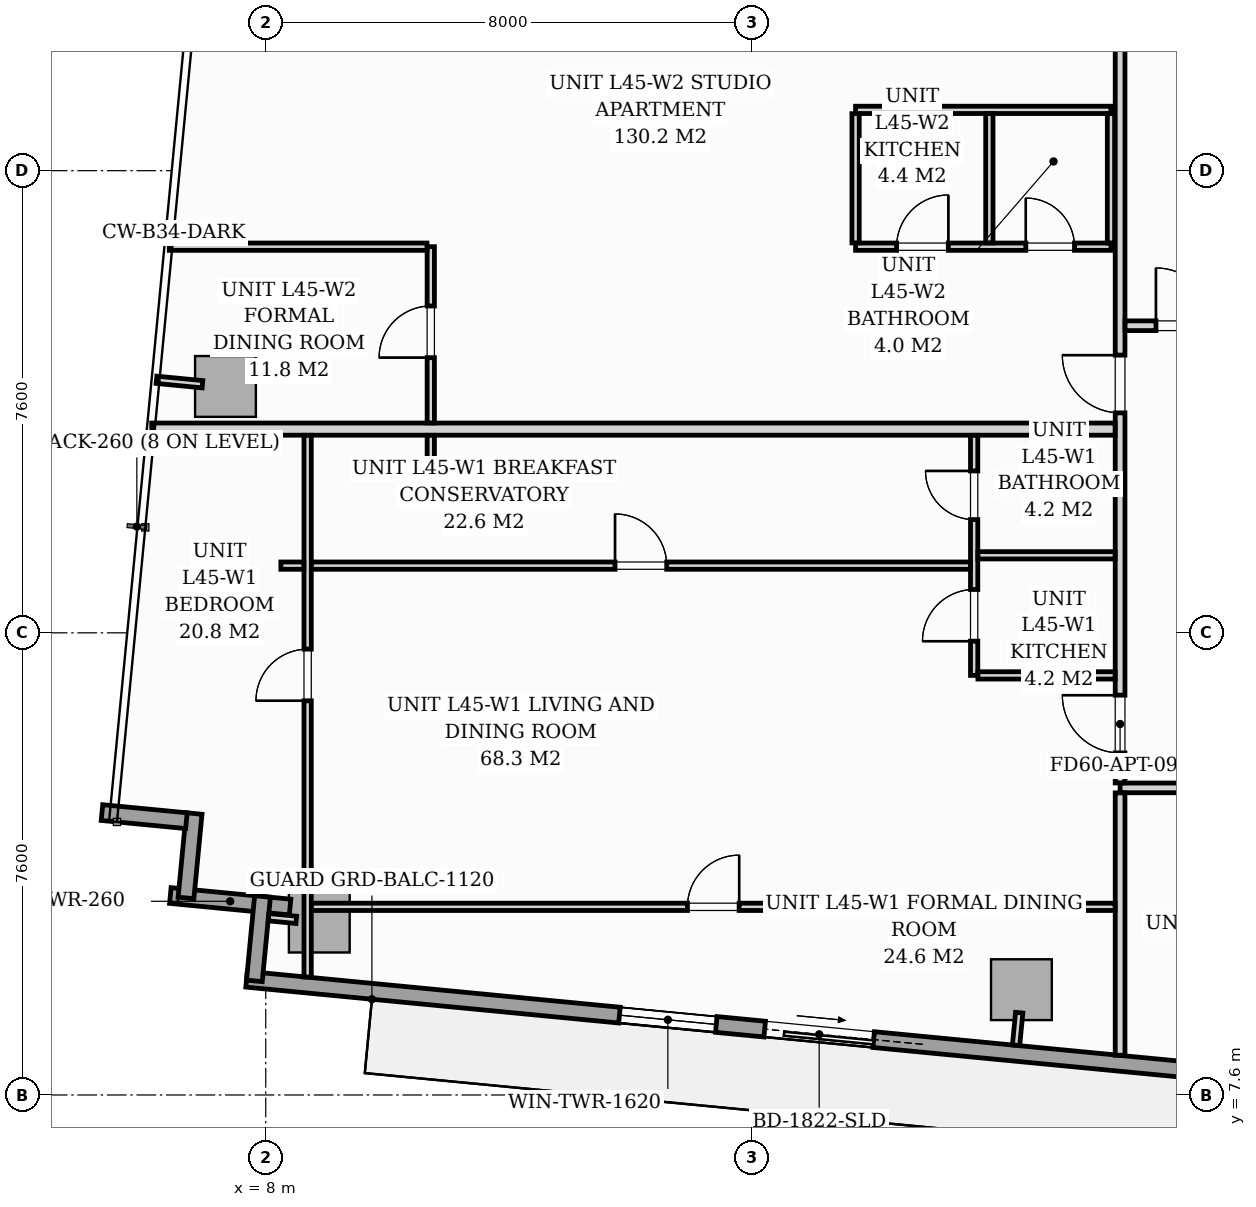
"""IFC4 building model, lengths in metres.
Left out: names, types, materials, properties, quantities, classifications, styles, units other than length and angle.
Written with IfcOpenShell. Run it as: python <this file> out.ifc"""

import sys

from ifc_helpers import new_model, si_unit, direction, frame, frame_2d, origin, origin_2d, place, context, subcontext, project, spatial, rectangle, extrude, source, transform, mapped, element, fill, save


model = new_model("IFC4")
c1 = context("Model", 3, precision=1e-05, world=origin(), true_north=direction((0.0, 1.0)))
c2 = subcontext(c1, "Body", "Model", "MODEL_VIEW")
j1 = project(units=[si_unit("LENGTHUNIT", "METRE"), si_unit("PLANEANGLEUNIT", "RADIAN")], contexts=[c1])
p1 = place(None, origin())
s1 = spatial("IfcSite", under=j1, at=p1, CompositionType="ELEMENT")
p2 = place(p1, origin())
s2 = spatial("IfcBuilding", under=s1, at=p2, CompositionType="ELEMENT")
p3 = place(p2, frame((0.0, 0.0, 156.6)))
s3 = spatial("IfcBuildingStorey", under=s2, at=p3, CompositionType="ELEMENT", Elevation=156.6)
m1 = source(origin(), c2, "Body", "SweptSolid", [
    extrude(rectangle(XDim=1.0, YDim=1.0, at=origin_2d()), origin(), (0.0, 0.0, 1.0), 3.196),
])
for number, where, z_axis, x_axis in (
    (1, (8.881, 10.443, 0.002), (0.0, 0.0, 1.0), (0.995, -0.096, 0.0)),
    (2, (20.427, 9.332, 0.002), (0.0, 0.0, 1.0), (0.995, -0.096, 0.0)),
    (3, (7.338, 19.252, 0.002), (0.0, 0.0, 1.0), (0.995, -0.096, 0.0)),
):
    element("IfcColumn", number, at=place(p3, frame(where, z_axis=z_axis, x_axis=x_axis)), inside=s3, PredefinedType="COLUMN", context=c2, shape_type="MappedRepresentation", body=[
        mapped(m1, transform((0.0, 0.0, 0.0), scale=1.0)),
    ])
p4 = place(p3, frame((8.4, 10.69, 0.0), z_axis=(0.0, 0.0, 1.0), x_axis=(-0.995391147587, 0.095898192396, 0.0)))
e4 = element("IfcWall", 4, at=p4, inside=s3, PredefinedType="STANDARD", context=c2, shape_type="SweptSolid", body=[
    extrude(rectangle(XDim=1.978, YDim=0.26, at=frame_2d((0.989, 0.0))), origin(), (0.0, 0.0, 1.0), 2.94),
])
p5 = place(p3, frame((6.688, 10.84, 0.0), z_axis=(0.0, 0.0, 1.0), x_axis=(0.09589913835, 0.995391056452, 0.0)))
e5 = element("IfcWall", 5, at=p5, inside=s3, PredefinedType="STANDARD", context=c2, shape_type="SweptSolid", body=[
    extrude(rectangle(XDim=1.395, YDim=0.26, at=frame_2d((0.698, 0.0))), origin(), (0.0, 0.0, 1.0), 2.94),
])
p6 = place(p3, frame((6.695, 12.111, 0.0), z_axis=(0.0, 0.0, 1.0), x_axis=(-0.99540614245, 0.095742423056, 0.0)))
e6 = element("IfcWall", 6, at=p6, inside=s3, PredefinedType="STANDARD", context=c2, shape_type="SweptSolid", body=[
    extrude(rectangle(XDim=1.395, YDim=0.26, at=frame_2d((0.697, 0.0))), origin(), (0.0, 0.0, 1.0), 2.94),
])
p7 = place(p3, frame((24.617, 7.873, 0.0), z_axis=(0.0, 0.0, 1.0), x_axis=(-0.995395976631, 0.095848055311, 0.0)))
e7 = element("IfcWall", 7, at=p7, inside=s3, PredefinedType="STANDARD", context=c2, shape_type="SweptSolid", body=[
    extrude(rectangle(XDim=17.01, YDim=0.26, at=frame_2d((8.505, 0.0))), origin(), (0.0, 0.0, 1.0), 2.94),
])
p8 = place(p7, frame((6.65, 0.0, 0.0)))
e8 = element("IfcOpeningElement", 8, at=p8, cuts=e7, PredefinedType="OPENING", context=c2, shape_type="SweptSolid", body=[
    extrude(rectangle(XDim=1.8, YDim=2.06, at=frame_2d((0.9, 1.03))), frame((0.0, 0.14, 0.0), z_axis=(0.0, -1.0, 0.0), x_axis=(1.0, 0.0, 0.0)), (0.0, 0.0, 1.0), 0.28),
])
p9 = place(p7, frame((9.25, 0.0, 0.65)))
e9 = element("IfcOpeningElement", 9, at=p9, cuts=e7, PredefinedType="OPENING", context=c2, shape_type="SweptSolid", body=[
    extrude(rectangle(XDim=1.6, YDim=1.5, at=frame_2d((0.8, 0.75))), frame((0.0, 0.14, 0.0), z_axis=(0.0, -1.0, 0.0), x_axis=(1.0, 0.0, 0.0)), (0.0, 0.0, 1.0), 0.28),
])
p10 = place(p3, frame((7.813, 9.476, 0.0), z_axis=(0.0, 0.0, 1.0), x_axis=(0.095915846097, 0.995389446633, 0.0)))
e10 = element("IfcWall", 10, at=p10, inside=s3, PredefinedType="STANDARD", context=c2, shape_type="SweptSolid", body=[
    extrude(rectangle(XDim=1.395, YDim=0.26, at=frame_2d((0.697, 0.0))), origin(), (0.0, 0.0, 1.0), 2.94),
])
p11 = place(p3, frame((22.05, 12.65, 0.0), z_axis=(0.0, 0.0, 1.0), x_axis=(1.0, 0.0, 0.0)))
e11 = element("IfcWall", 11, at=p11, inside=s3, PredefinedType="PARTITIONING", context=c2, shape_type="SweptSolid", body=[
    extrude(rectangle(XDim=25.65, YDim=0.16, at=frame_2d((12.825, 0.0))), origin(), (0.0, 0.0, 1.0), 2.94),
])
p12 = place(p11, frame((1.736, 0.0, 0.0)))
e12 = element("IfcOpeningElement", 12, at=p12, cuts=e11, PredefinedType="OPENING", context=c2, shape_type="SweptSolid", body=[
    extrude(rectangle(XDim=0.95, YDim=2.06, at=frame_2d((0.475, 1.03))), frame((0.0, 0.09, 0.0), z_axis=(0.0, -1.0, 0.0), x_axis=(1.0, 0.0, 0.0)), (0.0, 0.0, 1.0), 0.18),
])
p13 = place(p11, frame((10.3, 0.0, 0.0)))
e13 = element("IfcOpeningElement", 13, at=p13, cuts=e11, PredefinedType="OPENING", context=c2, shape_type="SweptSolid", body=[
    extrude(rectangle(XDim=0.95, YDim=2.06, at=frame_2d((0.475, 1.03))), frame((0.0, 0.09, 0.0), z_axis=(0.0, -1.0, 0.0), x_axis=(1.0, 0.0, 0.0)), (0.0, 0.0, 1.0), 0.18),
])
p14 = place(p11, frame((22.965, 0.0, 0.0)))
e14 = element("IfcOpeningElement", 14, at=p14, cuts=e11, PredefinedType="OPENING", context=c2, shape_type="SweptSolid", body=[
    extrude(rectangle(XDim=0.95, YDim=2.06, at=frame_2d((0.475, 1.03))), frame((0.0, 0.09, 0.0), z_axis=(0.0, -1.0, 0.0), x_axis=(1.0, 0.0, 0.0)), (0.0, 0.0, 1.0), 0.18),
])
p15 = place(p3, frame((22.05, 8.253, 0.0), z_axis=(0.0, 0.0, 1.0), x_axis=(0.0, 1.0, 0.0)))
e15 = element("IfcWall", 15, at=p15, inside=s3, PredefinedType="PARTITIONING", context=c2, shape_type="SweptSolid", body=[
    extrude(rectangle(XDim=4.315, YDim=0.16, at=frame_2d((2.157, 0.0))), origin(), (0.0, 0.0, 1.0), 2.94),
])
p16 = place(p3, frame((22.05, 12.732, 0.0), z_axis=(0.0, 0.0, 1.0), x_axis=(0.0, 1.0, 0.0)))
e16 = element("IfcWall", 16, at=p16, inside=s3, PredefinedType="PARTITIONING", context=c2, shape_type="SweptSolid", body=[
    extrude(rectangle(XDim=14.685, YDim=0.16, at=frame_2d((7.343, 0.0))), origin(), (0.0, 0.0, 1.0), 2.94),
])
p17 = place(p16, frame((0.493, 0.0, 0.0)))
e17 = element("IfcOpeningElement", 17, at=p17, cuts=e16, PredefinedType="OPENING", context=c2, shape_type="SweptSolid", body=[
    extrude(rectangle(XDim=0.95, YDim=2.06, at=frame_2d((0.475, 1.03))), frame((0.0, 0.09, 0.0), z_axis=(0.0, -1.0, 0.0), x_axis=(1.0, 0.0, 0.0)), (0.0, 0.0, 1.0), 0.18),
])
p18 = place(p16, frame((6.085, 0.0, 0.0)))
e18 = element("IfcOpeningElement", 18, at=p18, cuts=e16, PredefinedType="OPENING", context=c2, shape_type="SweptSolid", body=[
    extrude(rectangle(XDim=0.95, YDim=2.06, at=frame_2d((0.475, 1.03))), frame((0.0, 0.09, 0.0), z_axis=(0.0, -1.0, 0.0), x_axis=(1.0, 0.0, 0.0)), (0.0, 0.0, 1.0), 0.18),
])
p19 = place(p3, frame((6.125, 18.55, 0.0), z_axis=(0.0, 0.0, 1.0), x_axis=(1.0, 0.0, 0.0)))
e19 = element("IfcWall", 19, at=p19, inside=s3, PredefinedType="PARTITIONING", context=c2, shape_type="SweptSolid", body=[
    extrude(rectangle(XDim=15.843, YDim=0.2, at=frame_2d((7.921, 0.0))), origin(), (0.0, 0.0, 1.0), 2.063),
])
p20 = place(p3, frame((19.65, 14.5, 0.0), z_axis=(0.0, 0.0, 1.0), x_axis=(0.0, 1.0, 0.0)))
e20 = element("IfcWall", 20, at=p20, inside=s3, PredefinedType="PARTITIONING", context=c2, shape_type="SweptSolid", body=[
    extrude(rectangle(XDim=3.948, YDim=0.12, at=frame_2d((1.974, 0.0))), origin(), (0.0, 0.0, 1.0), 2.94),
])
p21 = place(p20, frame((0.563, 0.0, 0.0)))
e21 = element("IfcOpeningElement", 21, at=p21, cuts=e20, PredefinedType="OPENING", context=c2, shape_type="SweptSolid", body=[
    extrude(rectangle(XDim=0.85, YDim=2.05, at=frame_2d((0.425, 1.025))), frame((0.0, 0.07, 0.0), z_axis=(0.0, -1.0, 0.0), x_axis=(1.0, 0.0, 0.0)), (0.0, 0.0, 1.0), 0.14),
])
p22 = place(p20, frame((2.562, 0.0, 0.0)))
e22 = element("IfcOpeningElement", 22, at=p22, cuts=e20, PredefinedType="OPENING", context=c2, shape_type="SweptSolid", body=[
    extrude(rectangle(XDim=0.8, YDim=2.02, at=frame_2d((0.4, 1.01))), frame((0.0, 0.07, 0.0), z_axis=(0.0, -1.0, 0.0), x_axis=(1.0, 0.0, 0.0)), (0.0, 0.0, 1.0), 0.14),
])
for number, where, z_axis, x_axis in (
    (23, (19.712, 16.475, 0.0), (0.0, 0.0, 1.0), (1.0, 0.0, 0.0)),
    (24, (19.712, 14.5, 0.0), (0.0, 0.0, 1.0), (1.0, 0.0, 0.0)),
):
    element("IfcWall", number, at=place(p3, frame(where, z_axis=z_axis, x_axis=x_axis)), inside=s3, PredefinedType="PARTITIONING", context=c2, shape_type="SweptSolid", body=[
        extrude(rectangle(XDim=2.256, YDim=0.12, at=frame_2d((1.128, 0.0))), origin(), (0.0, 0.0, 1.0), 2.94),
    ])
p23 = place(p3, frame((8.689, 9.54, 0.0), z_axis=(0.0, 0.0, 1.0), x_axis=(0.0, 1.0, 0.0)))
e25 = element("IfcWall", 25, at=p23, inside=s3, PredefinedType="PARTITIONING", context=c2, shape_type="SweptSolid", body=[
    extrude(rectangle(XDim=8.908, YDim=0.12, at=frame_2d((4.454, 0.0))), origin(), (0.0, 0.0, 1.0), 2.382),
])
p24 = place(p23, frame((4.542, 0.0, 0.0)))
e26 = element("IfcOpeningElement", 26, at=p24, cuts=e25, PredefinedType="OPENING", context=c2, shape_type="SweptSolid", body=[
    extrude(rectangle(XDim=0.85, YDim=2.05, at=frame_2d((0.425, 1.025))), frame((0.0, 0.07, 0.0), z_axis=(0.0, -1.0, 0.0), x_axis=(1.0, 0.0, 0.0)), (0.0, 0.0, 1.0), 0.14),
])
p25 = place(p3, frame((8.751, 10.694, 0.0), z_axis=(0.0, 0.0, 1.0), x_axis=(1.0, 0.0, 0.0)))
e27 = element("IfcWall", 27, at=p25, inside=s3, PredefinedType="PARTITIONING", context=c2, shape_type="SweptSolid", body=[
    extrude(rectangle(XDim=13.217, YDim=0.12, at=frame_2d((6.608, 0.0))), origin(), (0.0, 0.0, 1.0), 2.94),
])
p26 = place(p25, frame((6.184, 0.0, 0.0)))
e28 = element("IfcOpeningElement", 28, at=p26, cuts=e27, PredefinedType="OPENING", context=c2, shape_type="SweptSolid", body=[
    extrude(rectangle(XDim=0.85, YDim=2.05, at=frame_2d((0.425, 1.025))), frame((0.0, 0.07, 0.0), z_axis=(0.0, -1.0, 0.0), x_axis=(1.0, 0.0, 0.0)), (0.0, 0.0, 1.0), 0.14),
])
p27 = place(p3, frame((8.249, 16.305, 0.0), z_axis=(0.0, 0.0, 1.0), x_axis=(1.0, 0.0, 0.0)))
e29 = element("IfcWall", 29, at=p27, inside=s3, PredefinedType="PARTITIONING", context=c2, shape_type="SweptSolid", body=[
    extrude(rectangle(XDim=0.378, YDim=0.12, at=frame_2d((0.189, 0.0))), origin(), (0.0, 0.0, 1.0), 2.94),
])
p28 = place(p3, frame((8.751, 16.305, 0.0), z_axis=(0.0, 0.0, 1.0), x_axis=(1.0, 0.0, 0.0)))
e30 = element("IfcWall", 30, at=p28, inside=s3, PredefinedType="PARTITIONING", context=c2, shape_type="SweptSolid", body=[
    extrude(rectangle(XDim=10.837, YDim=0.12, at=frame_2d((5.418, 0.0))), origin(), (0.0, 0.0, 1.0), 2.94),
])
p29 = place(p28, frame((4.993, 0.0, 0.0)))
e31 = element("IfcOpeningElement", 31, at=p29, cuts=e30, PredefinedType="OPENING", context=c2, shape_type="SweptSolid", body=[
    extrude(rectangle(XDim=0.85, YDim=2.05, at=frame_2d((0.425, 1.025))), frame((0.0, 0.07, 0.0), z_axis=(0.0, -1.0, 0.0), x_axis=(1.0, 0.0, 0.0)), (0.0, 0.0, 1.0), 0.14),
])
p30 = place(p3, frame((17.7, 21.55, 0.0), z_axis=(0.0, 0.0, 1.0), x_axis=(1.0, 0.0, 0.0)))
e32 = element("IfcWall", 32, at=p30, inside=s3, PredefinedType="PARTITIONING", context=c2, shape_type="SweptSolid", body=[
    extrude(rectangle(XDim=4.2, YDim=0.12, at=frame_2d((2.1, 0.0))), origin(), (0.0, 0.0, 1.0), 2.94),
])
p31 = place(p30, frame((0.675, 0.0, 0.0)))
e33 = element("IfcOpeningElement", 33, at=p31, cuts=e32, PredefinedType="OPENING", context=c2, shape_type="SweptSolid", body=[
    extrude(rectangle(XDim=0.85, YDim=2.05, at=frame_2d((0.425, 1.025))), frame((0.0, 0.07, 0.0), z_axis=(0.0, -1.0, 0.0), x_axis=(1.0, 0.0, 0.0)), (0.0, 0.0, 1.0), 0.14),
])
p32 = place(p30, frame((2.8, 0.0, 0.0)))
e34 = element("IfcOpeningElement", 34, at=p32, cuts=e32, PredefinedType="OPENING", context=c2, shape_type="SweptSolid", body=[
    extrude(rectangle(XDim=0.8, YDim=2.02, at=frame_2d((0.4, 1.01))), frame((0.0, 0.07, 0.0), z_axis=(0.0, -1.0, 0.0), x_axis=(1.0, 0.0, 0.0)), (0.0, 0.0, 1.0), 0.14),
])
p33 = place(p3, frame((17.7, 23.8, 0.0), z_axis=(0.0, 0.0, 1.0), x_axis=(1.0, 0.0, 0.0)))
e35 = element("IfcWall", 35, at=p33, inside=s3, PredefinedType="PARTITIONING", context=c2, shape_type="SweptSolid", body=[
    extrude(rectangle(XDim=4.2, YDim=0.12, at=frame_2d((2.1, 0.0))), origin(), (0.0, 0.0, 1.0), 2.94),
])
for number, where, z_axis, x_axis in (
    (36, (17.7, 21.612, 0.0), (0.0, 0.0, 1.0), (0.0, 1.0, 0.0)),
    (37, (19.9, 21.612, 0.0), (0.0, 0.0, 1.0), (0.0, 1.0, 0.0)),
    (38, (21.9, 21.612, 0.0), (0.0, 0.0, 1.0), (0.0, 1.0, 0.0)),
):
    element("IfcWall", number, at=place(p3, frame(where, z_axis=z_axis, x_axis=x_axis)), inside=s3, PredefinedType="PARTITIONING", context=c2, shape_type="SweptSolid", body=[
        extrude(rectangle(XDim=2.126, YDim=0.12, at=frame_2d((1.063, 0.0))), origin(), (0.0, 0.0, 1.0), 2.94),
    ])
p34 = place(p3, frame((10.714, 18.05, 0.0), z_axis=(0.0, 0.0, 1.0), x_axis=(0.0, 1.0, 0.0)))
e39 = element("IfcWall", 39, at=p34, inside=s3, PredefinedType="PARTITIONING", context=c2, shape_type="SweptSolid", body=[
    extrude(rectangle(XDim=0.398, YDim=0.12, at=frame_2d((0.199, 0.0))), origin(), (0.0, 0.0, 1.0), 2.94),
])
p35 = place(p3, frame((10.714, 18.652, 0.0), z_axis=(0.0, 0.0, 1.0), x_axis=(0.0, 1.0, 0.0)))
e40 = element("IfcWall", 40, at=p35, inside=s3, PredefinedType="PARTITIONING", context=c2, shape_type="SweptSolid", body=[
    extrude(rectangle(XDim=2.898, YDim=0.12, at=frame_2d((1.449, 0.0))), origin(), (0.0, 0.0, 1.0), 2.94),
])
p36 = place(p35, frame((1.073, 0.0, 0.0)))
e41 = element("IfcOpeningElement", 41, at=p36, cuts=e40, PredefinedType="OPENING", context=c2, shape_type="SweptSolid", body=[
    extrude(rectangle(XDim=0.85, YDim=2.05, at=frame_2d((0.425, 1.025))), frame((0.0, 0.07, 0.0), z_axis=(0.0, -1.0, 0.0), x_axis=(1.0, 0.0, 0.0)), (0.0, 0.0, 1.0), 0.14),
])
p37 = place(p3, frame((6.414, 21.55, 0.0), z_axis=(0.0, 0.0, 1.0), x_axis=(1.0, 0.0, 0.0)))
e42 = element("IfcWall", 42, at=p37, inside=s3, PredefinedType="PARTITIONING", context=c2, shape_type="SweptSolid", body=[
    extrude(rectangle(XDim=4.238, YDim=0.12, at=frame_2d((2.119, 0.0))), origin(), (0.0, 0.0, 1.0), 2.94),
])
p38 = place(p3, frame((22.132, 20.25, 0.0), z_axis=(0.0, 0.0, 1.0), x_axis=(1.0, 0.0, 0.0)))
e43 = element("IfcWall", 43, at=p38, inside=s3, PredefinedType="PARTITIONING", context=c2, shape_type="SweptSolid", body=[
    extrude(rectangle(XDim=1.886, YDim=0.16, at=frame_2d((0.943, 0.0))), origin(), (0.0, 0.0, 1.0), 2.94),
])
p39 = place(p38, frame((0.508, 0.0, 0.0)))
e44 = element("IfcOpeningElement", 44, at=p39, cuts=e43, PredefinedType="OPENING", context=c2, shape_type="SweptSolid", body=[
    extrude(rectangle(XDim=0.95, YDim=2.06, at=frame_2d((0.475, 1.03))), frame((0.0, 0.09, 0.0), z_axis=(0.0, -1.0, 0.0), x_axis=(1.0, 0.0, 0.0)), (0.0, 0.0, 1.0), 0.18),
])
p40 = place(p3, frame((8.502, 10.48, 0.0), z_axis=(0.0, 0.0, 1.0), x_axis=(-0.995384576284, 0.09596637586, 0.0)))
e45 = element("IfcWall", 45, at=p40, inside=s3, PredefinedType="PARTITIONING", context=c2, shape_type="SweptSolid", body=[
    extrude(rectangle(XDim=0.458, YDim=0.12, at=frame_2d((0.229, 0.0))), origin(), (0.0, 0.0, 1.0), 2.94),
])
p41 = place(p3, frame((20.391, 8.953, 0.0), z_axis=(0.0, 0.0, 1.0), x_axis=(-0.096222656154, -0.995359834654, 0.0)))
e46 = element("IfcWall", 46, at=p41, inside=s3, PredefinedType="PARTITIONING", context=c2, shape_type="SweptSolid", body=[
    extrude(rectangle(XDim=0.538, YDim=0.12, at=frame_2d((0.269, 0.0))), origin(), (0.0, 0.0, 1.0), 2.94),
])
p42 = place(p3, frame((6.959, 19.288, 0.0), z_axis=(0.0, 0.0, 1.0), x_axis=(-0.995377786728, 0.096036772582, 0.0)))
e47 = element("IfcWall", 47, at=p42, inside=s3, PredefinedType="PARTITIONING", context=c2, shape_type="SweptSolid", body=[
    extrude(rectangle(XDim=0.76, YDim=0.12, at=frame_2d((0.38, 0.0))), origin(), (0.0, 0.0, 1.0), 2.94),
])
m2 = source(origin(), c2, "Body", "SweptSolid", [
    extrude(rectangle(XDim=1.8, YDim=2.06, at=frame_2d((0.9, 1.03))), frame((0.0, 0.025, 0.0), z_axis=(0.0, -1.0, 0.0), x_axis=(1.0, 0.0, 0.0)), (0.0, 0.0, 1.0), 0.05),
])
p43 = place(p8, origin())
e48 = element("IfcDoor", 48, at=p43, inside=s3, OperationType="SLIDING_TO_LEFT", PredefinedType="DOOR", context=c2, shape_type="MappedRepresentation", body=[
    mapped(m2, transform((0.0, 0.0, 0.0), scale=1.0)),
])
fill(e8, e48)
m3 = source(origin(), c2, "Body", "SweptSolid", [
    extrude(rectangle(XDim=1.6, YDim=1.5, at=frame_2d((0.8, 0.75))), frame((0.0, 0.03, 0.0), z_axis=(0.0, -1.0, 0.0), x_axis=(1.0, 0.0, 0.0)), (0.0, 0.0, 1.0), 0.06),
])
p44 = place(p9, origin())
e49 = element("IfcWindow", 49, at=p44, inside=s3, PartitioningType="SINGLE_PANEL", PredefinedType="WINDOW", context=c2, shape_type="MappedRepresentation", body=[
    mapped(m3, transform((0.0, 0.0, 0.0), scale=1.0)),
])
fill(e9, e49)
m4 = source(origin(), c2, "Body", "SweptSolid", [
    extrude(rectangle(XDim=0.95, YDim=2.06, at=frame_2d((0.475, 1.03))), frame((0.0, 0.025, 0.0), z_axis=(0.0, -1.0, 0.0), x_axis=(1.0, 0.0, 0.0)), (0.0, 0.0, 1.0), 0.05),
])
p45 = place(p17, origin())
e50 = element("IfcDoor", 50, at=p45, inside=s3, OperationType="SINGLE_SWING_RIGHT", PredefinedType="DOOR", context=c2, shape_type="MappedRepresentation", body=[
    mapped(m4, transform((0.0, 0.0, 0.0), scale=1.0)),
])
fill(e17, e50)
m5 = source(origin(), c2, "Body", "SweptSolid", [
    extrude(rectangle(XDim=0.85, YDim=2.05, at=frame_2d((0.425, 1.025))), frame((0.0, 0.025, 0.0), z_axis=(0.0, -1.0, 0.0), x_axis=(1.0, 0.0, 0.0)), (0.0, 0.0, 1.0), 0.05),
])
p46 = place(p21, origin())
e51 = element("IfcDoor", 51, at=p46, inside=s3, OperationType="SINGLE_SWING_LEFT", PredefinedType="DOOR", context=c2, shape_type="MappedRepresentation", body=[
    mapped(m5, transform((0.0, 0.0, 0.0), scale=1.0)),
])
fill(e21, e51)
m6 = source(origin(), c2, "Body", "SweptSolid", [
    extrude(rectangle(XDim=0.8, YDim=2.02, at=frame_2d((0.4, 1.01))), frame((0.0, 0.025, 0.0), z_axis=(0.0, -1.0, 0.0), x_axis=(1.0, 0.0, 0.0)), (0.0, 0.0, 1.0), 0.05),
])
p47 = place(p22, origin())
e52 = element("IfcDoor", 52, at=p47, inside=s3, OperationType="SINGLE_SWING_RIGHT", PredefinedType="DOOR", context=c2, shape_type="MappedRepresentation", body=[
    mapped(m6, transform((0.0, 0.0, 0.0), scale=1.0)),
])
fill(e22, e52)
p48 = place(p24, origin())
e53 = element("IfcDoor", 53, at=p48, inside=s3, OperationType="SINGLE_SWING_LEFT", PredefinedType="DOOR", context=c2, shape_type="MappedRepresentation", body=[
    mapped(m5, transform((0.0, 0.0, 0.0), scale=1.0)),
])
fill(e26, e53)
p49 = place(p26, origin())
e54 = element("IfcDoor", 54, at=p49, inside=s3, OperationType="SINGLE_SWING_RIGHT", PredefinedType="DOOR", context=c2, shape_type="MappedRepresentation", body=[
    mapped(m5, transform((0.0, 0.0, 0.0), scale=1.0)),
])
fill(e28, e54)
p50 = place(p29, origin())
e55 = element("IfcDoor", 55, at=p50, inside=s3, OperationType="SINGLE_SWING_LEFT", PredefinedType="DOOR", context=c2, shape_type="MappedRepresentation", body=[
    mapped(m5, transform((0.0, 0.0, 0.0), scale=1.0)),
])
fill(e31, e55)
p51 = place(p18, origin())
e56 = element("IfcDoor", 56, at=p51, inside=s3, OperationType="SINGLE_SWING_RIGHT", PredefinedType="DOOR", context=c2, shape_type="MappedRepresentation", body=[
    mapped(m4, transform((0.0, 0.0, 0.0), scale=1.0)),
])
fill(e18, e56)
p52 = place(p36, origin())
e57 = element("IfcDoor", 57, at=p52, inside=s3, OperationType="SINGLE_SWING_LEFT", PredefinedType="DOOR", context=c2, shape_type="MappedRepresentation", body=[
    mapped(m5, transform((0.0, 0.0, 0.0), scale=1.0)),
])
fill(e41, e57)
p53 = place(p31, origin())
e58 = element("IfcDoor", 58, at=p53, inside=s3, OperationType="SINGLE_SWING_RIGHT", PredefinedType="DOOR", context=c2, shape_type="MappedRepresentation", body=[
    mapped(m5, transform((0.0, 0.0, 0.0), scale=1.0)),
])
fill(e33, e58)
p54 = place(p32, origin())
e59 = element("IfcDoor", 59, at=p54, inside=s3, OperationType="SINGLE_SWING_LEFT", PredefinedType="DOOR", context=c2, shape_type="MappedRepresentation", body=[
    mapped(m6, transform((0.0, 0.0, 0.0), scale=1.0)),
])
fill(e34, e59)
p55 = place(p39, origin())
e60 = element("IfcDoor", 60, at=p55, inside=s3, OperationType="SINGLE_SWING_LEFT", PredefinedType="DOOR", context=c2, shape_type="MappedRepresentation", body=[
    mapped(m4, transform((0.0, 0.0, 0.0), scale=1.0)),
])
fill(e44, e60)
save(model, sys.argv[1])
